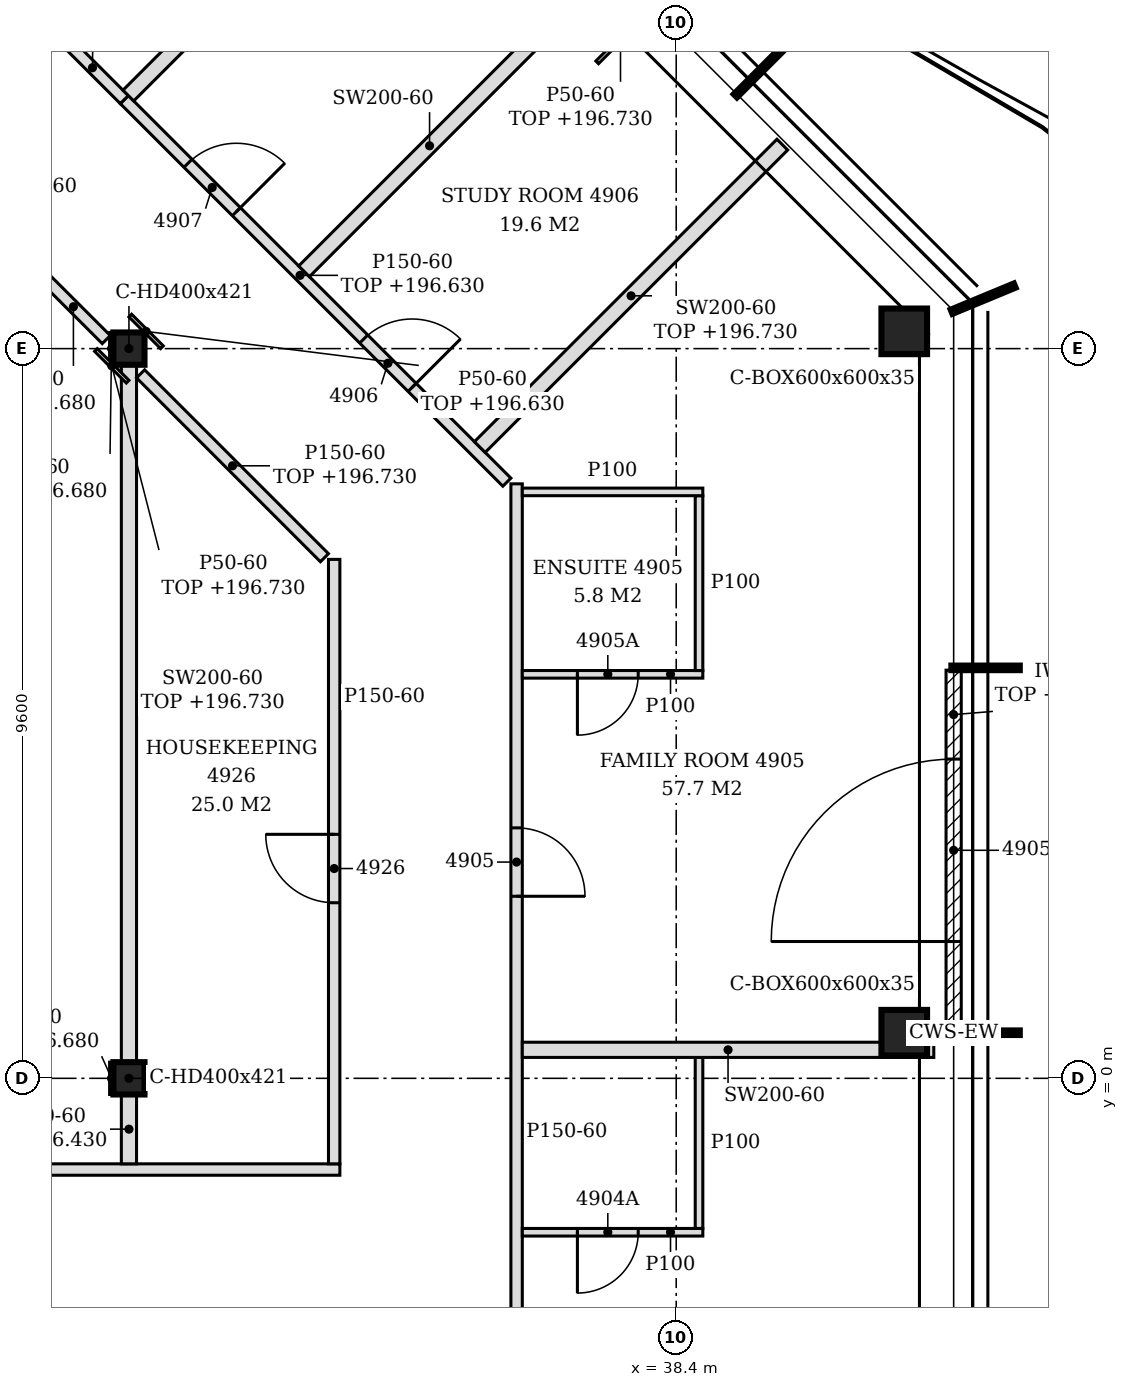
"""IFC4 building model, lengths in metres.
Left out: names, types, materials, properties, quantities, classifications, styles, units other than length and angle.
Written with IfcOpenShell. Run it as: python <this file> out.ifc"""

import sys

from ifc_helpers import new_model, si_unit, direction, frame, frame_2d, origin, origin_2d, place, context, subcontext, project, spatial, polyline, rectangle, hollow_rectangle, i_section, outline, extrude, clip, halfspace, element, fill, save


model = new_model("IFC4")
c1 = context("Model", 3, precision=1e-05, world=origin(), true_north=direction((0.0, 1.0)))
c2 = subcontext(c1, "Body", "Model", "MODEL_VIEW")
j1 = project(units=[si_unit("LENGTHUNIT", "METRE"), si_unit("PLANEANGLEUNIT", "RADIAN")], contexts=[c1])
p1 = place(None, origin())
s1 = spatial("IfcSite", under=j1, at=p1, CompositionType="ELEMENT")
p2 = place(p1, origin())
s2 = spatial("IfcBuilding", under=s1, at=p2, CompositionType="ELEMENT")
p3 = place(p2, frame((0.0, 0.0, 193.8)))
s3 = spatial("IfcBuildingStorey", under=s2, at=p3, CompositionType="ELEMENT", Elevation=193.8)
for number, where, z_axis, x_axis in (
    (1, (41.4, 0.6, -0.15), (0.183, -0.122, 0.976), (0.555, 0.832, 0.0)),
    (2, (41.4, 9.827, -0.15), (0.183, -0.122, 0.976), (0.555, 0.832, 0.0)),
):
    element("IfcColumn", number, at=place(p3, frame(where, z_axis=z_axis, x_axis=x_axis)), inside=s3, PredefinedType="COLUMN", context=c2, shape_type="Clipping", body=[
        clip(clip(extrude(hollow_rectangle(XDim=0.6, YDim=0.6, WallThickness=0.035, at=origin_2d()), origin(), (0.0, 0.0, 1.0), 3.69), halfspace(frame((0.0, 0.0, 0.021), z_axis=(0.0, 0.0, 1.0), x_axis=(1.0, 0.0, 0.0)), True)), halfspace(frame((0.0, 0.0, 3.668), z_axis=(0.0, 0.0, 1.0), x_axis=(1.0, 0.0, 0.0)), False)),
    ])
for number, where, z_axis, x_axis in (
    (3, (31.2, 0.0, -0.15), (0.0, 0.0, 1.0), (1.0, 0.0, 0.0)),
    (4, (31.2, 9.6, -0.15), (0.0, 0.0, 1.0), (1.0, 0.0, 0.0)),
):
    element("IfcColumn", number, at=place(p3, frame(where, z_axis=z_axis, x_axis=x_axis)), inside=s3, PredefinedType="COLUMN", context=c2, shape_type="SweptSolid", body=[
        extrude(i_section(OverallWidth=0.409, OverallDepth=0.425, WebThickness=0.033, FlangeThickness=0.052, FilletRadius=0.015, at=origin_2d()), origin(), (0.0, 0.0, 1.0), 3.6),
    ])
p4 = place(p3, frame((42.05, 0.63, 0.0), z_axis=(0.0, 0.0, 1.0), x_axis=(0.0, 1.0, 0.0)))
e5 = element("IfcWall", 5, at=p4, inside=s3, PredefinedType="NOTDEFINED", context=c2, shape_type="SweptSolid", body=[
    extrude(rectangle(XDim=4.74, YDim=0.2, at=frame_2d((2.37, 0.0))), origin(), (0.0, 0.0, 1.0), 2.95),
])
p5 = place(p4, frame((1.17, 0.0, 0.0)))
e6 = element("IfcOpeningElement", 6, at=p5, cuts=e5, PredefinedType="OPENING", context=c2, shape_type="SweptSolid", body=[
    extrude(rectangle(XDim=2.4, YDim=2.4, at=frame_2d((1.2, 1.2))), frame((0.0, 0.11, 0.0), z_axis=(0.0, -1.0, 0.0), x_axis=(1.0, 0.0, 0.0)), (0.0, 0.0, 1.0), 0.22),
])
p6 = place(p3, frame((36.3, -6.334, 0.0), z_axis=(0.0, 0.0, 1.0), x_axis=(0.0, 1.0, 0.0)))
e7 = element("IfcWall", 7, at=p6, inside=s3, PredefinedType="PARTITIONING", context=c2, shape_type="SweptSolid", body=[
    extrude(outline(polyline([(0.0, 0.0), (14.155, 0.0), (14.155, 3.45), (11.384, 3.45), (11.382, 2.93), (11.184, 2.93), (11.182, 3.45), (6.584, 3.45), (6.582, 2.93), (6.384, 2.93), (6.382, 3.45), (1.784, 3.45), (1.782, 2.93), (1.584, 2.93), (1.582, 3.45), (0.0, 3.45), (0.0, 0.0)])), frame((0.0, 0.075, 0.0), z_axis=(0.0, -1.0, 0.0), x_axis=(1.0, 0.0, 0.0)), (0.0, 0.0, 1.0), 0.15),
])
p7 = place(p6, frame((1.614, 0.0, 0.0)))
e8 = element("IfcOpeningElement", 8, at=p7, cuts=e7, PredefinedType="OPENING", context=c2, shape_type="SweptSolid", body=[
    extrude(rectangle(XDim=0.9, YDim=2.1, at=frame_2d((0.45, 1.05))), frame((0.0, 0.085, 0.0), z_axis=(0.0, -1.0, 0.0), x_axis=(1.0, 0.0, 0.0)), (0.0, 0.0, 1.0), 0.17),
])
p8 = place(p6, frame((8.729, 0.0, 0.0)))
e9 = element("IfcOpeningElement", 9, at=p8, cuts=e7, PredefinedType="OPENING", context=c2, shape_type="SweptSolid", body=[
    extrude(rectangle(XDim=0.9, YDim=2.1, at=frame_2d((0.45, 1.05))), frame((0.0, 0.085, 0.0), z_axis=(0.0, -1.0, 0.0), x_axis=(1.0, 0.0, 0.0)), (0.0, 0.0, 1.0), 0.17),
])
p9 = place(p3, frame((36.375, -2.025, 0.0), z_axis=(0.0, 0.0, 1.0), x_axis=(1.0, 0.0, 0.0)))
e10 = element("IfcWall", 10, at=p9, inside=s3, PredefinedType="PARTITIONING", context=c2, shape_type="SweptSolid", body=[
    extrude(rectangle(XDim=2.375, YDim=0.1, at=frame_2d((1.188, 0.0))), origin(), (0.0, 0.0, 1.0), 3.45),
])
p10 = place(p9, frame((0.725, 0.0, 0.0)))
e11 = element("IfcOpeningElement", 11, at=p10, cuts=e10, PredefinedType="OPENING", context=c2, shape_type="SweptSolid", body=[
    extrude(rectangle(XDim=0.8, YDim=2.1, at=frame_2d((0.4, 1.05))), frame((0.0, 0.06, 0.0), z_axis=(0.0, -1.0, 0.0), x_axis=(1.0, 0.0, 0.0)), (0.0, 0.0, 1.0), 0.12),
])
p11 = place(p3, frame((38.7, -1.975, 0.0), z_axis=(0.0, 0.0, 1.0), x_axis=(0.0, 1.0, 0.0)))
e12 = element("IfcWall", 12, at=p11, inside=s3, PredefinedType="PARTITIONING", context=c2, shape_type="SweptSolid", body=[
    extrude(outline(polyline([(0.0, 0.0), (2.25, 0.0), (2.25, 3.45), (2.225, 3.45), (2.223, 2.93), (2.025, 2.93), (2.023, 3.45), (0.0, 3.45), (0.0, 0.0)])), frame((0.0, 0.05, 0.0), z_axis=(0.0, -1.0, 0.0), x_axis=(1.0, 0.0, 0.0)), (0.0, 0.0, 1.0), 0.1),
])
p12 = place(p3, frame((19.125, -1.2, 0.0), z_axis=(0.0, 0.0, 1.0), x_axis=(1.0, 0.0, 0.0)))
e13 = element("IfcWall", 13, at=p12, inside=s3, PredefinedType="PARTITIONING", context=c2, shape_type="SweptSolid", body=[
    extrude(outline(polyline([(0.0, 0.0), (14.85, 0.0), (14.85, 3.45), (12.225, 3.45), (12.223, 2.63), (11.925, 2.63), (11.923, 3.45), (0.225, 3.45), (0.223, 2.83), (0.0, 2.83), (0.0, 0.0)])), frame((0.0, 0.075, 0.0), z_axis=(0.0, -1.0, 0.0), x_axis=(1.0, 0.0, 0.0)), (0.0, 0.0, 1.0), 0.15),
])
p13 = place(p12, frame((1.175, 0.0, 0.0)))
e14 = element("IfcOpeningElement", 14, at=p13, cuts=e13, PredefinedType="OPENING", context=c2, shape_type="SweptSolid", body=[
    extrude(rectangle(XDim=0.8, YDim=2.1, at=frame_2d((0.4, 1.05))), frame((0.0, 0.085, 0.0), z_axis=(0.0, -1.0, 0.0), x_axis=(1.0, 0.0, 0.0)), (0.0, 0.0, 1.0), 0.17),
])
p14 = place(p3, frame((31.2, -1.125, 0.0), z_axis=(0.0, 0.0, 1.0), x_axis=(0.0, 1.0, 0.0)))
e15 = element("IfcWall", 15, at=p14, inside=s3, PredefinedType="PARTITIONING", context=c2, shape_type="SweptSolid", body=[
    extrude(rectangle(XDim=0.913, YDim=0.2, at=frame_2d((0.456, 0.0))), origin(), (0.0, 0.0, 1.0), 2.63),
])
p15 = place(p3, frame((33.9, -1.125, 0.0), z_axis=(0.0, 0.0, 1.0), x_axis=(0.0, 1.0, 0.0)))
e16 = element("IfcWall", 16, at=p15, inside=s3, PredefinedType="PARTITIONING", context=c2, shape_type="SweptSolid", body=[
    extrude(outline(polyline([(0.0, 0.0), (7.952, 0.0), (7.952, 3.45), (6.175, 3.45), (6.173, 2.93), (5.975, 2.93), (5.973, 3.45), (1.375, 3.45), (1.373, 2.93), (1.175, 2.93), (1.173, 3.45), (0.0, 3.45), (0.0, 0.0)])), frame((0.0, 0.075, 0.0), z_axis=(0.0, -1.0, 0.0), x_axis=(1.0, 0.0, 0.0)), (0.0, 0.0, 1.0), 0.15),
])
p16 = place(p15, frame((3.435, 0.0, 0.0)))
e17 = element("IfcOpeningElement", 17, at=p16, cuts=e16, PredefinedType="OPENING", context=c2, shape_type="SweptSolid", body=[
    extrude(rectangle(XDim=0.9, YDim=2.1, at=frame_2d((0.45, 1.05))), frame((0.0, 0.085, 0.0), z_axis=(0.0, -1.0, 0.0), x_axis=(1.0, 0.0, 0.0)), (0.0, 0.0, 1.0), 0.17),
])
p17 = place(p3, frame((31.2, 0.212, 0.0), z_axis=(0.0, 0.0, 1.0), x_axis=(0.0, 1.0, 0.0)))
e18 = element("IfcWall", 18, at=p17, inside=s3, PredefinedType="PARTITIONING", context=c2, shape_type="SweptSolid", body=[
    extrude(rectangle(XDim=9.175, YDim=0.2, at=frame_2d((4.587, 0.0))), origin(), (0.0, 0.0, 1.0), 2.93),
])
p18 = place(p3, frame((36.375, 0.375, 0.0), z_axis=(0.0, 0.0, 1.0), x_axis=(1.0, 0.0, 0.0)))
e19 = element("IfcWall", 19, at=p18, inside=s3, PredefinedType="PARTITIONING", context=c2, shape_type="SweptSolid", body=[
    extrude(outline(polyline([(0.0, 0.0), (4.672, 0.0), (4.792, 0.863), (4.954, 1.725), (5.18, 2.587), (5.414, 3.45), (0.0, 3.45), (0.0, 2.587), (0.0, 1.725), (0.0, 0.863), (0.0, 0.0)])), frame((0.0, 0.1, 0.0), z_axis=(0.0, -1.0, 0.0), x_axis=(1.0, 0.0, 0.0)), (0.0, 0.0, 1.0), 0.2),
])
p19 = place(p3, frame((36.375, 5.315, 0.0), z_axis=(0.0, 0.0, 1.0), x_axis=(1.0, 0.0, 0.0)))
e20 = element("IfcWall", 20, at=p19, inside=s3, PredefinedType="PARTITIONING", context=c2, shape_type="SweptSolid", body=[
    extrude(rectangle(XDim=2.375, YDim=0.1, at=frame_2d((1.188, 0.0))), origin(), (0.0, 0.0, 1.0), 3.45),
])
p20 = place(p19, frame((0.725, 0.0, 0.0)))
e21 = element("IfcOpeningElement", 21, at=p20, cuts=e20, PredefinedType="OPENING", context=c2, shape_type="SweptSolid", body=[
    extrude(rectangle(XDim=0.8, YDim=2.1, at=frame_2d((0.4, 1.05))), frame((0.0, 0.06, 0.0), z_axis=(0.0, -1.0, 0.0), x_axis=(1.0, 0.0, 0.0)), (0.0, 0.0, 1.0), 0.12),
])
p21 = place(p3, frame((38.7, 5.365, 0.0), z_axis=(0.0, 0.0, 1.0), x_axis=(0.0, 1.0, 0.0)))
e22 = element("IfcWall", 22, at=p21, inside=s3, PredefinedType="PARTITIONING", context=c2, shape_type="SweptSolid", body=[
    extrude(rectangle(XDim=2.3, YDim=0.1, at=frame_2d((1.15, 0.0))), origin(), (0.0, 0.0, 1.0), 3.45),
])
p22 = place(p3, frame((33.772, 6.849, 0.0), z_axis=(0.0, 0.0, 1.0), x_axis=(-0.707106781187, 0.707106781187, 0.0)))
e23 = element("IfcWall", 23, at=p22, inside=s3, PredefinedType="PARTITIONING", context=c2, shape_type="SweptSolid", body=[
    extrude(rectangle(XDim=3.421, YDim=0.15, at=frame_2d((1.71, 0.0))), origin(), (0.0, 0.0, 1.0), 2.93),
])
p23 = place(p3, frame((36.375, 7.715, 0.0), z_axis=(0.0, 0.0, 1.0), x_axis=(1.0, 0.0, 0.0)))
e24 = element("IfcWall", 24, at=p23, inside=s3, PredefinedType="PARTITIONING", context=c2, shape_type="SweptSolid", body=[
    extrude(rectangle(XDim=2.375, YDim=0.1, at=frame_2d((1.188, 0.0))), origin(), (0.0, 0.0, 1.0), 3.45),
])
p24 = place(p3, frame((36.172, 7.843, 0.0), z_axis=(0.0, 0.0, 1.0), x_axis=(-0.70712393086, 0.707089631097, 0.0)))
e25 = element("IfcWall", 25, at=p24, inside=s3, PredefinedType="PARTITIONING", context=c2, shape_type="SweptSolid", body=[
    extrude(rectangle(XDim=7.118, YDim=0.15, at=frame_2d((3.559, 0.0))), origin(), (0.0, 0.0, 1.0), 2.83),
])
p25 = place(p24, frame((1.763, 0.0, 0.0)))
e26 = element("IfcOpeningElement", 26, at=p25, cuts=e25, PredefinedType="OPENING", context=c2, shape_type="SweptSolid", body=[
    extrude(rectangle(XDim=0.9, YDim=2.1, at=frame_2d((0.45, 1.05))), frame((0.0, 0.085, 0.0), z_axis=(0.0, -1.0, 0.0), x_axis=(1.0, 0.0, 0.0)), (0.0, 0.0, 1.0), 0.17),
])
p26 = place(p24, frame((5.033, 0.0, 0.0)))
e27 = element("IfcOpeningElement", 27, at=p26, cuts=e25, PredefinedType="OPENING", context=c2, shape_type="SweptSolid", body=[
    extrude(rectangle(XDim=0.9, YDim=2.1, at=frame_2d((0.45, 1.05))), frame((0.0, 0.085, 0.0), z_axis=(0.0, -1.0, 0.0), x_axis=(1.0, 0.0, 0.0)), (0.0, 0.0, 1.0), 0.17),
])
p27 = place(p3, frame((35.816, 8.305, 0.0), z_axis=(0.0, 0.0, 1.0), x_axis=(0.707193537431, 0.707020014296, 0.0)))
e28 = element("IfcWall", 28, at=p27, inside=s3, PredefinedType="PARTITIONING", context=c2, shape_type="SweptSolid", body=[
    extrude(rectangle(XDim=5.628, YDim=0.2, at=frame_2d((2.814, 0.0))), origin(), (0.0, 0.0, 1.0), 2.93),
])
p28 = place(p3, frame((30.902, 9.719, 0.0), z_axis=(0.0, 0.0, 1.0), x_axis=(-0.707406212347, 0.706807223175, 0.0)))
e29 = element("IfcWall", 29, at=p28, inside=s3, PredefinedType="PARTITIONING", context=c2, shape_type="SweptSolid", body=[
    extrude(rectangle(XDim=1.223, YDim=0.15, at=frame_2d((0.611, 0.0))), origin(), (0.0, 0.0, 1.0), 2.88),
])
p29 = place(p3, frame((33.504, 10.617, 0.0), z_axis=(0.0, 0.0, 1.0), x_axis=(0.707028369139, 0.70718518454, 0.0)))
e30 = element("IfcWall", 30, at=p29, inside=s3, PredefinedType="PARTITIONING", context=c2, shape_type="SweptSolid", body=[
    extrude(rectangle(XDim=4.671, YDim=0.2, at=frame_2d((2.335, 0.0))), origin(), (0.0, 0.0, 1.0), 3.45),
])
p30 = place(p3, frame((31.139, 12.876, 0.0), z_axis=(0.0, 0.0, 1.0), x_axis=(-0.707260784618, 0.706952744207, 0.0)))
e31 = element("IfcWall", 31, at=p30, inside=s3, PredefinedType="PARTITIONING", context=c2, shape_type="SweptSolid", body=[
    extrude(rectangle(XDim=3.17, YDim=0.15, at=frame_2d((1.585, 0.0))), origin(), (0.0, 0.0, 1.0), 2.83),
])
p31 = place(p30, frame((1.185, 0.0, 0.0)))
e32 = element("IfcOpeningElement", 32, at=p31, cuts=e31, PredefinedType="OPENING", context=c2, shape_type="SweptSolid", body=[
    extrude(rectangle(XDim=0.9, YDim=2.1, at=frame_2d((0.45, 1.05))), frame((0.0, 0.085, 0.0), z_axis=(0.0, -1.0, 0.0), x_axis=(1.0, 0.0, 0.0)), (0.0, 0.0, 1.0), 0.17),
])
p32 = place(p3, frame((31.192, 12.929, 0.0), z_axis=(0.0, 0.0, 1.0), x_axis=(0.70701981688, 0.707193734799, 0.0)))
e33 = element("IfcWall", 33, at=p32, inside=s3, PredefinedType="PARTITIONING", context=c2, shape_type="SweptSolid", body=[
    extrude(rectangle(XDim=5.615, YDim=0.2, at=frame_2d((2.808, 0.0))), origin(), (0.0, 0.0, 1.0), 2.63),
])
p33 = place(p3, frame((30.97, -0.212, 0.0), z_axis=(0.0, 0.0, 1.0), x_axis=(0.0, 1.0, 0.0)))
e34 = element("IfcWall", 34, at=p33, inside=s3, PredefinedType="PARTITIONING", context=c2, shape_type="SweptSolid", body=[
    extrude(rectangle(XDim=0.425, YDim=0.05, at=frame_2d((0.212, 0.0))), origin(), (0.0, 0.0, 1.0), 2.88),
])
p34 = place(p3, frame((30.97, 9.387, 0.0), z_axis=(0.0, 0.0, 1.0), x_axis=(0.0, 1.0, 0.0)))
e35 = element("IfcWall", 35, at=p34, inside=s3, PredefinedType="PARTITIONING", context=c2, shape_type="SweptSolid", body=[
    extrude(rectangle(XDim=0.425, YDim=0.05, at=frame_2d((0.212, 0.0))), origin(), (0.0, 0.0, 1.0), 2.88),
])
p35 = place(p3, frame((31.183, 9.165, 0.0), z_axis=(0.0, 0.0, 1.0), x_axis=(-0.707520656867, 0.70669266312, 0.0)))
e36 = element("IfcWall", 36, at=p35, inside=s3, PredefinedType="PARTITIONING", context=c2, shape_type="SweptSolid", body=[
    extrude(rectangle(XDim=0.59, YDim=0.05, at=frame_2d((0.295, 0.0))), origin(), (0.0, 0.0, 1.0), 2.93),
])
p36 = place(p3, frame((31.635, 9.618, 0.0), z_axis=(0.0, 0.0, 1.0), x_axis=(-0.707520656867, 0.70669266312, 0.0)))
e37 = element("IfcWall", 37, at=p36, inside=s3, PredefinedType="PARTITIONING", context=c2, shape_type="SweptSolid", body=[
    extrude(rectangle(XDim=0.59, YDim=0.05, at=frame_2d((0.295, 0.0))), origin(), (0.0, 0.0, 1.0), 2.83),
])
p37 = place(p3, frame((37.36, 13.366, 0.0), z_axis=(0.0, 0.0, 1.0), x_axis=(0.707106781187, 0.707106781187, 0.0)))
e38 = element("IfcWall", 38, at=p37, inside=s3, PredefinedType="PARTITIONING", context=c2, shape_type="SweptSolid", body=[
    extrude(rectangle(XDim=0.868, YDim=0.05, at=frame_2d((0.434, 0.0))), origin(), (0.0, 0.0, 1.0), 2.93),
])
p38 = place(p5, origin())
e39 = element("IfcDoor", 39, at=p38, inside=s3, OperationType="SINGLE_SWING_LEFT", PredefinedType="DOOR", context=c2, shape_type="SweptSolid", body=[
    extrude(rectangle(XDim=2.4, YDim=2.4, at=frame_2d((1.2, 1.2))), frame((0.0, 0.025, 0.0), z_axis=(0.0, -1.0, 0.0), x_axis=(1.0, 0.0, 0.0)), (0.0, 0.0, 1.0), 0.05),
])
fill(e6, e39)
p39 = place(p10, frame((0.8, 0.0, 0.0), z_axis=(0.0, 0.0, 1.0), x_axis=(-1.0, 0.0, 0.0)))
e40 = element("IfcDoor", 40, at=p39, inside=s3, OperationType="SINGLE_SWING_RIGHT", PredefinedType="DOOR", context=c2, shape_type="SweptSolid", body=[
    extrude(rectangle(XDim=0.8, YDim=2.1, at=frame_2d((0.4, 1.05))), frame((0.0, 0.025, 0.0), z_axis=(0.0, -1.0, 0.0), x_axis=(1.0, 0.0, 0.0)), (0.0, 0.0, 1.0), 0.05),
])
fill(e11, e40)
p40 = place(p8, frame((0.9, 0.0, 0.0), z_axis=(0.0, 0.0, 1.0), x_axis=(-1.0, 0.0, 0.0)))
e41 = element("IfcDoor", 41, at=p40, inside=s3, OperationType="SINGLE_SWING_RIGHT", PredefinedType="DOOR", context=c2, shape_type="SweptSolid", body=[
    extrude(rectangle(XDim=0.9, YDim=2.1, at=frame_2d((0.45, 1.05))), frame((0.0, 0.025, 0.0), z_axis=(0.0, -1.0, 0.0), x_axis=(1.0, 0.0, 0.0)), (0.0, 0.0, 1.0), 0.05),
])
fill(e9, e41)
p41 = place(p20, frame((0.8, 0.0, 0.0), z_axis=(0.0, 0.0, 1.0), x_axis=(-1.0, 0.0, 0.0)))
e42 = element("IfcDoor", 42, at=p41, inside=s3, OperationType="SINGLE_SWING_RIGHT", PredefinedType="DOOR", context=c2, shape_type="SweptSolid", body=[
    extrude(rectangle(XDim=0.8, YDim=2.1, at=frame_2d((0.4, 1.05))), frame((0.0, 0.025, 0.0), z_axis=(0.0, -1.0, 0.0), x_axis=(1.0, 0.0, 0.0)), (0.0, 0.0, 1.0), 0.05),
])
fill(e21, e42)
p42 = place(p25, frame((0.9, 0.0, 0.0), z_axis=(0.0, 0.0, 1.0), x_axis=(-1.0, 0.0, 0.0)))
e43 = element("IfcDoor", 43, at=p42, inside=s3, OperationType="SINGLE_SWING_RIGHT", PredefinedType="DOOR", context=c2, shape_type="SweptSolid", body=[
    extrude(rectangle(XDim=0.9, YDim=2.1, at=frame_2d((0.45, 1.05))), frame((0.0, 0.025, 0.0), z_axis=(0.0, -1.0, 0.0), x_axis=(1.0, 0.0, 0.0)), (0.0, 0.0, 1.0), 0.05),
])
fill(e26, e43)
p43 = place(p26, frame((0.9, 0.0, 0.0), z_axis=(0.0, 0.0, 1.0), x_axis=(-1.0, 0.0, 0.0)))
e44 = element("IfcDoor", 44, at=p43, inside=s3, OperationType="SINGLE_SWING_RIGHT", PredefinedType="DOOR", context=c2, shape_type="SweptSolid", body=[
    extrude(rectangle(XDim=0.9, YDim=2.1, at=frame_2d((0.45, 1.05))), frame((0.0, 0.025, 0.0), z_axis=(0.0, -1.0, 0.0), x_axis=(1.0, 0.0, 0.0)), (0.0, 0.0, 1.0), 0.05),
])
fill(e27, e44)
p44 = place(p16, origin())
e45 = element("IfcDoor", 45, at=p44, inside=s3, OperationType="SINGLE_SWING_RIGHT", PredefinedType="DOOR", context=c2, shape_type="SweptSolid", body=[
    extrude(rectangle(XDim=0.9, YDim=2.1, at=frame_2d((0.45, 1.05))), frame((0.0, 0.025, 0.0), z_axis=(0.0, -1.0, 0.0), x_axis=(1.0, 0.0, 0.0)), (0.0, 0.0, 1.0), 0.05),
])
fill(e17, e45)
save(model, sys.argv[1])
